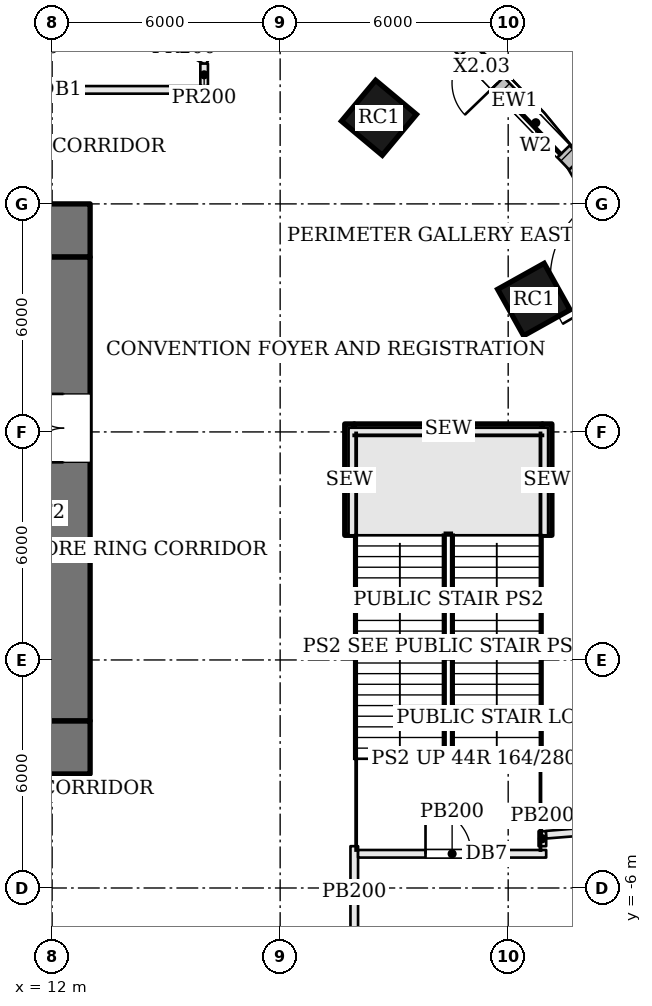
"""IFC4 building model, lengths in metres.
Left out: names, types, materials, properties, quantities, classifications, styles, units other than length and angle.
Written with IfcOpenShell. Run it as: python <this file> out.ifc"""

import sys

from ifc_helpers import new_model, si_unit, direction, frame, frame_2d, origin, origin_2d, place, context, subcontext, project, spatial, rectangle, extrude, element, fill, save


model = new_model("IFC4")
c1 = context("Model", 3, precision=1e-05, world=origin(), true_north=direction((0.0, 1.0)))
c2 = subcontext(c1, "Body", "Model", "MODEL_VIEW")
j1 = project(units=[si_unit("LENGTHUNIT", "METRE"), si_unit("PLANEANGLEUNIT", "RADIAN")], contexts=[c1])
p1 = place(None, origin())
s1 = spatial("IfcSite", under=j1, at=p1, CompositionType="ELEMENT")
p2 = place(p1, origin())
s2 = spatial("IfcBuilding", under=s1, at=p2, CompositionType="ELEMENT")
p3 = place(p2, origin())
s3 = spatial("IfcBuildingStorey", under=s2, at=p3, CompositionType="ELEMENT", Elevation=0.0)
p4 = place(p3, frame((-13.0, 11.3, 0.0), z_axis=(0.0, 0.0, 1.0), x_axis=(1.0, 0.0, 0.0)))
e1 = element("IfcWall", 1, at=p4, inside=s3, PredefinedType="SHEAR", context=c2, shape_type="SweptSolid", body=[
    extrude(rectangle(XDim=26.0, YDim=1.4, at=frame_2d((13.0, 0.0))), origin(), (0.0, 0.0, 1.0), 7.2),
])
p5 = place(p4, frame((8.975, 0.0, 0.0)))
e2 = element("IfcOpeningElement", 2, at=p5, cuts=e1, PredefinedType="OPENING", context=c2, shape_type="SweptSolid", body=[
    extrude(rectangle(XDim=0.7, YDim=2.1, at=frame_2d((0.35, 1.05))), frame((0.0, 0.71, 0.0), z_axis=(0.0, -1.0, 0.0), x_axis=(1.0, 0.0, 0.0)), (0.0, 0.0, 1.0), 1.42),
])
p6 = place(p4, frame((11.425, 0.0, 0.0)))
e3 = element("IfcOpeningElement", 3, at=p6, cuts=e1, PredefinedType="OPENING", context=c2, shape_type="SweptSolid", body=[
    extrude(rectangle(XDim=0.7, YDim=2.1, at=frame_2d((0.35, 1.05))), frame((0.0, 0.71, 0.0), z_axis=(0.0, -1.0, 0.0), x_axis=(1.0, 0.0, 0.0)), (0.0, 0.0, 1.0), 1.42),
])
p7 = place(p4, frame((13.725, 0.0, 0.0)))
e4 = element("IfcOpeningElement", 4, at=p7, cuts=e1, PredefinedType="OPENING", context=c2, shape_type="SweptSolid", body=[
    extrude(rectangle(XDim=1.0, YDim=2.1, at=frame_2d((0.5, 1.05))), frame((0.0, 0.71, 0.0), z_axis=(0.0, -1.0, 0.0), x_axis=(1.0, 0.0, 0.0)), (0.0, 0.0, 1.0), 1.42),
])
p8 = place(p4, frame((15.65, 0.0, 0.0)))
e5 = element("IfcOpeningElement", 5, at=p8, cuts=e1, PredefinedType="OPENING", context=c2, shape_type="SweptSolid", body=[
    extrude(rectangle(XDim=1.0, YDim=2.1, at=frame_2d((0.5, 1.05))), frame((0.0, 0.71, 0.0), z_axis=(0.0, -1.0, 0.0), x_axis=(1.0, 0.0, 0.0)), (0.0, 0.0, 1.0), 1.42),
])
p9 = place(p4, frame((6.65, 0.0, 0.0)))
e6 = element("IfcOpeningElement", 6, at=p9, cuts=e1, PredefinedType="OPENING", context=c2, shape_type="SweptSolid", body=[
    extrude(rectangle(XDim=1.0, YDim=2.1, at=frame_2d((0.5, 1.05))), frame((0.0, 0.71, 0.0), z_axis=(0.0, -1.0, 0.0), x_axis=(1.0, 0.0, 0.0)), (0.0, 0.0, 1.0), 1.42),
])
p10 = place(p4, frame((18.35, 0.0, 0.0)))
e7 = element("IfcOpeningElement", 7, at=p10, cuts=e1, PredefinedType="OPENING", context=c2, shape_type="SweptSolid", body=[
    extrude(rectangle(XDim=1.0, YDim=2.1, at=frame_2d((0.5, 1.05))), frame((0.0, 0.71, 0.0), z_axis=(0.0, -1.0, 0.0), x_axis=(1.0, 0.0, 0.0)), (0.0, 0.0, 1.0), 1.42),
])
p11 = place(p3, frame((-13.0, -2.3, 0.0), z_axis=(0.0, 0.0, 1.0), x_axis=(1.0, 0.0, 0.0)))
e8 = element("IfcWall", 8, at=p11, inside=s3, PredefinedType="SHEAR", context=c2, shape_type="SweptSolid", body=[
    extrude(rectangle(XDim=26.0, YDim=1.4, at=frame_2d((13.0, 0.0))), origin(), (0.0, 0.0, 1.0), 7.2),
])
p12 = place(p11, frame((9.275, 0.0, 0.0)))
e9 = element("IfcOpeningElement", 9, at=p12, cuts=e8, PredefinedType="OPENING", context=c2, shape_type="SweptSolid", body=[
    extrude(rectangle(XDim=0.9, YDim=2.1, at=frame_2d((0.45, 1.05))), frame((0.0, 0.71, 0.0), z_axis=(0.0, -1.0, 0.0), x_axis=(1.0, 0.0, 0.0)), (0.0, 0.0, 1.0), 1.42),
])
p13 = place(p11, frame((12.525, 0.0, 0.0)))
e10 = element("IfcOpeningElement", 10, at=p13, cuts=e8, PredefinedType="OPENING", context=c2, shape_type="SweptSolid", body=[
    extrude(rectangle(XDim=0.9, YDim=2.1, at=frame_2d((0.45, 1.05))), frame((0.0, 0.71, 0.0), z_axis=(0.0, -1.0, 0.0), x_axis=(1.0, 0.0, 0.0)), (0.0, 0.0, 1.0), 1.42),
])
p14 = place(p11, frame((15.0, 0.0, 0.0)))
e11 = element("IfcOpeningElement", 11, at=p14, cuts=e8, PredefinedType="OPENING", context=c2, shape_type="SweptSolid", body=[
    extrude(rectangle(XDim=1.0, YDim=2.1, at=frame_2d((0.5, 1.05))), frame((0.0, 0.71, 0.0), z_axis=(0.0, -1.0, 0.0), x_axis=(1.0, 0.0, 0.0)), (0.0, 0.0, 1.0), 1.42),
])
p15 = place(p11, frame((16.7, 0.0, 0.0)))
e12 = element("IfcOpeningElement", 12, at=p15, cuts=e8, PredefinedType="OPENING", context=c2, shape_type="SweptSolid", body=[
    extrude(rectangle(XDim=0.9, YDim=2.1, at=frame_2d((0.45, 1.05))), frame((0.0, 0.71, 0.0), z_axis=(0.0, -1.0, 0.0), x_axis=(1.0, 0.0, 0.0)), (0.0, 0.0, 1.0), 1.42),
])
p16 = place(p11, frame((6.65, 0.0, 0.0)))
e13 = element("IfcOpeningElement", 13, at=p16, cuts=e8, PredefinedType="OPENING", context=c2, shape_type="SweptSolid", body=[
    extrude(rectangle(XDim=1.0, YDim=2.1, at=frame_2d((0.5, 1.05))), frame((0.0, 0.71, 0.0), z_axis=(0.0, -1.0, 0.0), x_axis=(1.0, 0.0, 0.0)), (0.0, 0.0, 1.0), 1.42),
])
p17 = place(p11, frame((18.35, 0.0, 0.0)))
e14 = element("IfcOpeningElement", 14, at=p17, cuts=e8, PredefinedType="OPENING", context=c2, shape_type="SweptSolid", body=[
    extrude(rectangle(XDim=1.0, YDim=2.1, at=frame_2d((0.5, 1.05))), frame((0.0, 0.71, 0.0), z_axis=(0.0, -1.0, 0.0), x_axis=(1.0, 0.0, 0.0)), (0.0, 0.0, 1.0), 1.42),
])
p18 = place(p3, frame((12.3, -1.6, 0.0), z_axis=(0.0, 0.0, 1.0), x_axis=(0.0, 1.0, 0.0)))
e15 = element("IfcWall", 15, at=p18, inside=s3, PredefinedType="SHEAR", context=c2, shape_type="SweptSolid", body=[
    extrude(rectangle(XDim=12.2, YDim=1.4, at=frame_2d((6.1, 0.0))), origin(), (0.0, 0.0, 1.0), 7.2),
])
p19 = place(p18, frame((6.8, 0.0, 0.0)))
e16 = element("IfcOpeningElement", 16, at=p19, cuts=e15, PredefinedType="OPENING", context=c2, shape_type="SweptSolid", body=[
    extrude(rectangle(XDim=1.8, YDim=2.1, at=frame_2d((0.9, 1.05))), frame((0.0, 0.71, 0.0), z_axis=(0.0, -1.0, 0.0), x_axis=(1.0, 0.0, 0.0)), (0.0, 0.0, 1.0), 1.42),
])
for number, where, z_axis, x_axis in (
    (17, (24.676, 9.483, 0.0), (0.0, 0.0, 1.0), (-0.487, 0.873, 0.0)),
    (18, (20.6, 14.266, 0.0), (0.0, 0.0, 1.0), (-0.767, 0.641, 0.0)),
):
    element("IfcColumn", number, at=place(p3, frame(where, z_axis=z_axis, x_axis=x_axis)), inside=s3, PredefinedType="COLUMN", context=c2, shape_type="SweptSolid", body=[
        extrude(rectangle(XDim=1.4, YDim=1.4, at=origin_2d()), origin(), (0.0, 0.0, 1.0), 7.2),
    ])
p20 = place(p3, frame((28.073, 9.072, 0.0), z_axis=(0.0, 0.0, 1.0), x_axis=(-0.502106426501, 0.864805837438, 0.0)))
e19 = element("IfcWall", 19, at=p20, inside=s3, PredefinedType="SOLIDWALL", context=c2, shape_type="SweptSolid", body=[
    extrude(rectangle(XDim=4.657, YDim=0.45, at=frame_2d((2.328, 0.0))), origin(), (0.0, 0.0, 1.0), 3.55),
])
p21 = place(p20, frame((1.128, 0.0, 0.0)))
e20 = element("IfcOpeningElement", 20, at=p21, cuts=e19, PredefinedType="OPENING", context=c2, shape_type="SweptSolid", body=[
    extrude(rectangle(XDim=2.4, YDim=3.2, at=frame_2d((1.2, 1.6))), frame((0.0, 0.235, 0.0), z_axis=(0.0, -1.0, 0.0), x_axis=(1.0, 0.0, 0.0)), (0.0, 0.0, 1.0), 0.47),
])
p22 = place(p3, frame((25.768, 13.056, 0.0), z_axis=(0.0, 0.0, 1.0), x_axis=(-0.694191591241, 0.719790271294, 0.0)))
e21 = element("IfcWall", 21, at=p22, inside=s3, PredefinedType="SOLIDWALL", context=c2, shape_type="SweptSolid", body=[
    extrude(rectangle(XDim=4.597, YDim=0.45, at=frame_2d((2.298, 0.0))), origin(), (0.0, 0.0, 1.0), 6.95),
])
p23 = place(p22, frame((0.45, 0.0, 0.9)))
e22 = element("IfcOpeningElement", 22, at=p23, cuts=e21, PredefinedType="OPENING", context=c2, shape_type="SweptSolid", body=[
    extrude(rectangle(XDim=2.1, YDim=5.0, at=frame_2d((1.05, 2.5))), frame((0.0, 0.235, 0.0), z_axis=(0.0, -1.0, 0.0), x_axis=(1.0, 0.0, 0.0)), (0.0, 0.0, 1.0), 0.47),
])
p24 = place(p22, frame((2.947, 0.0, 0.0)))
e23 = element("IfcOpeningElement", 23, at=p24, cuts=e21, PredefinedType="OPENING", context=c2, shape_type="SweptSolid", body=[
    extrude(rectangle(XDim=1.2, YDim=2.4, at=frame_2d((0.6, 1.2))), frame((0.0, 0.235, 0.0), z_axis=(0.0, -1.0, 0.0), x_axis=(1.0, 0.0, 0.0)), (0.0, 0.0, 1.0), 0.47),
])
p25 = place(p3, frame((19.95, -7.3, 0.0), z_axis=(0.0, 0.0, 1.0), x_axis=(0.0, 1.0, 0.0)))
e24 = element("IfcWall", 24, at=p25, inside=s3, PredefinedType="PARTITIONING", context=c2, shape_type="SweptSolid", body=[
    extrude(rectangle(XDim=2.4, YDim=0.2, at=frame_2d((1.2, 0.0))), origin(), (0.0, 0.0, 1.0), 6.23),
])
p26 = place(p3, frame((20.05, -5.1, 0.0), z_axis=(0.0, 0.0, 1.0), x_axis=(1.0, 0.0, 0.0)))
e25 = element("IfcWall", 25, at=p26, inside=s3, PredefinedType="PARTITIONING", context=c2, shape_type="SweptSolid", body=[
    extrude(rectangle(XDim=4.95, YDim=0.2, at=frame_2d((2.475, 0.0))), origin(), (0.0, 0.0, 1.0), 6.23),
])
p27 = place(p26, frame((1.775, 0.0, 0.0)))
e26 = element("IfcOpeningElement", 26, at=p27, cuts=e25, PredefinedType="OPENING", context=c2, shape_type="SweptSolid", body=[
    extrude(rectangle(XDim=1.2, YDim=2.1, at=frame_2d((0.6, 1.05))), frame((0.0, 0.11, 0.0), z_axis=(0.0, -1.0, 0.0), x_axis=(1.0, 0.0, 0.0)), (0.0, 0.0, 1.0), 0.22),
])
p28 = place(p3, frame((24.9, -4.9, 0.0), z_axis=(0.0, 0.0, 1.0), x_axis=(0.0, 1.0, 0.0)))
e27 = element("IfcWall", 27, at=p28, inside=s3, PredefinedType="PARTITIONING", context=c2, shape_type="SweptSolid", body=[
    extrude(rectangle(XDim=0.394, YDim=0.2, at=frame_2d((0.197, 0.0))), origin(), (0.0, 0.0, 1.0), 6.23),
])
p29 = place(p3, frame((25.0, -4.598, 0.0), z_axis=(0.0, 0.0, 1.0), x_axis=(0.996848217345, 0.079332411888, 0.0)))
e28 = element("IfcWall", 28, at=p29, inside=s3, PredefinedType="PARTITIONING", context=c2, shape_type="SweptSolid", body=[
    extrude(rectangle(XDim=3.314, YDim=0.2, at=frame_2d((1.657, 0.0))), origin(), (0.0, 0.0, 1.0), 6.23),
])
p30 = place(p3, frame((16.1, 15.0, 0.0), z_axis=(0.0, 0.0, 1.0), x_axis=(-1.0, 0.0, 0.0)))
e29 = element("IfcWall", 29, at=p30, inside=s3, PredefinedType="PARTITIONING", context=c2, shape_type="SweptSolid", body=[
    extrude(rectangle(XDim=9.55, YDim=0.2, at=frame_2d((4.775, 0.0))), origin(), (0.0, 0.0, 1.0), 6.23),
])
p31 = place(p30, frame((4.375, 0.0, 0.0)))
e30 = element("IfcOpeningElement", 30, at=p31, cuts=e29, PredefinedType="OPENING", context=c2, shape_type="SweptSolid", body=[
    extrude(rectangle(XDim=1.0, YDim=2.1, at=frame_2d((0.5, 1.05))), frame((0.0, 0.11, 0.0), z_axis=(0.0, -1.0, 0.0), x_axis=(1.0, 0.0, 0.0)), (0.0, 0.0, 1.0), 0.22),
])
p32 = place(p3, frame((14.846, 16.465, 0.0), z_axis=(0.0, 0.0, 1.0), x_axis=(0.863834413875, -0.503775848375, 0.0)))
e31 = element("IfcWall", 31, at=p32, inside=s3, PredefinedType="PARTITIONING", context=c2, shape_type="SweptSolid", body=[
    extrude(rectangle(XDim=1.436, YDim=0.2, at=frame_2d((0.718, 0.0))), origin(), (0.0, 0.0, 1.0), 6.58),
])
p33 = place(p3, frame((16.0, 15.692, 0.0), z_axis=(0.0, 0.0, 1.0), x_axis=(0.0, -1.0, 0.0)))
e32 = element("IfcWall", 32, at=p33, inside=s3, PredefinedType="PARTITIONING", context=c2, shape_type="SweptSolid", body=[
    extrude(rectangle(XDim=0.592, YDim=0.2, at=frame_2d((0.296, 0.0))), origin(), (0.0, 0.0, 1.0), 6.58),
])
p34 = place(p3, frame((24.9, 6.085, 0.0), z_axis=(0.0, 0.0, 1.0), x_axis=(-1.0, 0.0, 0.0)))
e33 = element("IfcWall", 33, at=p34, inside=s3, PredefinedType="SOLIDWALL", context=c2, shape_type="SweptSolid", body=[
    extrude(rectangle(XDim=4.95, YDim=0.25, at=frame_2d((2.475, 0.0))), origin(), (0.0, 0.0, 1.0), 6.95),
])
for number, where, z_axis, x_axis in (
    (34, (19.825, 3.28, 0.0), (0.0, 0.0, 1.0), (0.0, 1.0, 0.0)),
    (35, (25.025, 3.28, 0.0), (0.0, 0.0, 1.0), (0.0, 1.0, 0.0)),
):
    element("IfcWall", number, at=place(p3, frame(where, z_axis=z_axis, x_axis=x_axis)), inside=s3, PredefinedType="SOLIDWALL", context=c2, shape_type="SweptSolid", body=[
        extrude(rectangle(XDim=2.93, YDim=0.25, at=frame_2d((1.465, 0.0))), origin(), (0.0, 0.0, 1.0), 6.95),
    ])
p35 = place(p23, origin())
e36 = element("IfcWindow", 36, at=p35, inside=s3, PartitioningType="SINGLE_PANEL", PredefinedType="WINDOW", context=c2, shape_type="SweptSolid", body=[
    extrude(rectangle(XDim=2.1, YDim=5.0, at=frame_2d((1.05, 2.5))), frame((0.0, 0.135, 0.0), z_axis=(0.0, -1.0, 0.0), x_axis=(1.0, 0.0, 0.0)), (0.0, 0.0, 1.0), 0.06),
])
fill(e22, e36)
p36 = place(p24, frame((1.2, 0.0, 0.0), z_axis=(0.0, 0.0, 1.0), x_axis=(-1.0, 0.0, 0.0)))
e37 = element("IfcDoor", 37, at=p36, inside=s3, OperationType="SINGLE_SWING_LEFT", PredefinedType="DOOR", context=c2, shape_type="SweptSolid", body=[
    extrude(rectangle(XDim=1.2, YDim=2.4, at=frame_2d((0.6, 1.2))), frame((0.0, 0.025, 0.0), z_axis=(0.0, -1.0, 0.0), x_axis=(1.0, 0.0, 0.0)), (0.0, 0.0, 1.0), 0.05),
])
fill(e23, e37)
p37 = place(p19, origin())
e38 = element("IfcDoor", 38, at=p37, inside=s3, OperationType="DOUBLE_DOOR_SINGLE_SWING", PredefinedType="DOOR", context=c2, shape_type="SweptSolid", body=[
    extrude(rectangle(XDim=1.8, YDim=2.1, at=frame_2d((0.9, 1.05))), frame((0.0, 0.025, 0.0), z_axis=(0.0, -1.0, 0.0), x_axis=(1.0, 0.0, 0.0)), (0.0, 0.0, 1.0), 0.05),
])
fill(e16, e38)
p38 = place(p27, origin())
e39 = element("IfcDoor", 39, at=p38, inside=s3, OperationType="SINGLE_SWING_LEFT", PredefinedType="DOOR", context=c2, shape_type="SweptSolid", body=[
    extrude(rectangle(XDim=1.2, YDim=2.1, at=frame_2d((0.6, 1.05))), frame((0.0, 0.025, 0.0), z_axis=(0.0, -1.0, 0.0), x_axis=(1.0, 0.0, 0.0)), (0.0, 0.0, 1.0), 0.05),
])
fill(e26, e39)
save(model, sys.argv[1])
